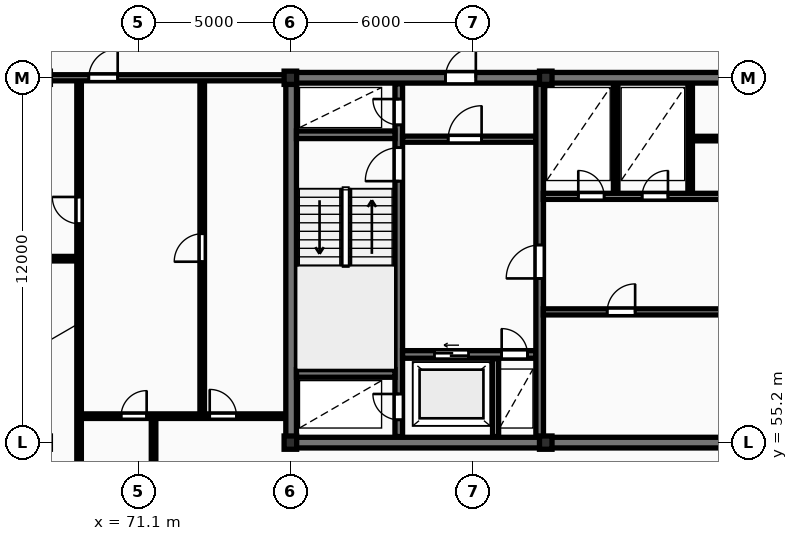
"""IFC4 building model, lengths in metres.
Left out: names, types, materials, properties, quantities, classifications, styles, units other than length and angle.
Written with IfcOpenShell. Run it as: python <this file> out.ifc"""

import sys

from ifc_helpers import new_model, si_unit, direction, frame, frame_2d, origin, origin_2d, place, context, subcontext, project, spatial, rectangle, i_section, extrude, element, fill, save


model = new_model("IFC4")
c1 = context("Model", 3, precision=1e-05, world=origin(), true_north=direction((0.0, 1.0)))
c2 = subcontext(c1, "Body", "Model", "MODEL_VIEW")
j1 = project(units=[si_unit("LENGTHUNIT", "METRE"), si_unit("PLANEANGLEUNIT", "RADIAN")], contexts=[c1])
p1 = place(None, origin())
s1 = spatial("IfcSite", under=j1, at=p1, CompositionType="ELEMENT")
p2 = place(p1, origin())
s2 = spatial("IfcBuilding", under=s1, at=p2, CompositionType="ELEMENT")
p3 = place(p2, frame((0.0, 0.0, 142.9)))
s3 = spatial("IfcBuildingStorey", under=s2, at=p3, CompositionType="ELEMENT", Elevation=142.9)
for number, where, z_axis, x_axis in (
    (1, (76.1, 55.2, 0.0), (0.0, 0.0, 1.0), (1.0, 0.0, 0.0)),
    (2, (76.1, 67.2, 0.0), (0.0, 0.0, 1.0), (1.0, 0.0, 0.0)),
    (3, (84.5, 55.2, 0.0), (0.0, 0.0, 1.0), (1.0, 0.0, 0.0)),
    (4, (84.5, 67.2, 0.0), (0.0, 0.0, 1.0), (1.0, 0.0, 0.0)),
):
    element("IfcColumn", number, at=place(p3, frame(where, z_axis=z_axis, x_axis=x_axis)), inside=s3, PredefinedType="COLUMN", context=c2, shape_type="SweptSolid", body=[
        extrude(i_section(OverallWidth=0.412, OverallDepth=0.437, WebThickness=0.036, FlangeThickness=0.052, FilletRadius=0.015, at=origin_2d()), origin(), (0.0, 0.0, 1.0), 3.6),
    ])
p4 = place(p3, frame((75.95, 55.2, 0.0), z_axis=(0.0, 0.0, 1.0), x_axis=(1.0, 0.0, 0.0)))
e5 = element("IfcWall", 5, at=p4, inside=s3, PredefinedType="SHEAR", context=c2, shape_type="SweptSolid", body=[
    extrude(rectangle(XDim=36.3, YDim=0.35, at=frame_2d((18.15, 0.0))), origin(), (0.0, 0.0, 1.0), 3.6),
])
p5 = place(p4, frame((15.1, 0.0, 0.0)))
e6 = element("IfcOpeningElement", 6, at=p5, cuts=e5, PredefinedType="OPENING", context=c2, shape_type="SweptSolid", body=[
    extrude(rectangle(XDim=1.1, YDim=2.1, at=frame_2d((0.55, 1.05))), frame((0.0, 0.185, 0.0), z_axis=(0.0, -1.0, 0.0), x_axis=(1.0, 0.0, 0.0)), (0.0, 0.0, 1.0), 0.37),
])
p6 = place(p3, frame((76.125, 55.375, 0.0), z_axis=(0.0, 0.0, 1.0), x_axis=(0.0, 1.0, 0.0)))
e7 = element("IfcWall", 7, at=p6, inside=s3, PredefinedType="SHEAR", context=c2, shape_type="SweptSolid", body=[
    extrude(rectangle(XDim=11.65, YDim=0.35, at=frame_2d((5.825, 0.0))), origin(), (0.0, 0.0, 1.0), 3.6),
])
p7 = place(p3, frame((75.95, 67.2, 0.0), z_axis=(0.0, 0.0, 1.0), x_axis=(1.0, 0.0, 0.0)))
e8 = element("IfcWall", 8, at=p7, inside=s3, PredefinedType="SHEAR", context=c2, shape_type="SweptSolid", body=[
    extrude(rectangle(XDim=36.3, YDim=0.35, at=frame_2d((18.15, 0.0))), origin(), (0.0, 0.0, 1.0), 3.6),
])
p8 = place(p7, frame((5.25, 0.0, 0.0)))
e9 = element("IfcOpeningElement", 9, at=p8, cuts=e8, PredefinedType="OPENING", context=c2, shape_type="SweptSolid", body=[
    extrude(rectangle(XDim=1.0, YDim=2.15, at=frame_2d((0.5, 1.075))), frame((0.0, 0.185, 0.0), z_axis=(0.0, -1.0, 0.0), x_axis=(1.0, 0.0, 0.0)), (0.0, 0.0, 1.0), 0.37),
])
p9 = place(p7, frame((21.6, 0.0, 0.0)))
e10 = element("IfcOpeningElement", 10, at=p9, cuts=e8, PredefinedType="OPENING", context=c2, shape_type="SweptSolid", body=[
    extrude(rectangle(XDim=1.5, YDim=2.2, at=frame_2d((0.75, 1.1))), frame((0.0, 0.185, 0.0), z_axis=(0.0, -1.0, 0.0), x_axis=(1.0, 0.0, 0.0)), (0.0, 0.0, 1.0), 0.37),
])
p10 = place(p7, frame((30.45, 0.0, 0.0)))
e11 = element("IfcOpeningElement", 11, at=p10, cuts=e8, PredefinedType="OPENING", context=c2, shape_type="SweptSolid", body=[
    extrude(rectangle(XDim=1.0, YDim=2.15, at=frame_2d((0.5, 1.075))), frame((0.0, 0.185, 0.0), z_axis=(0.0, -1.0, 0.0), x_axis=(1.0, 0.0, 0.0)), (0.0, 0.0, 1.0), 0.37),
])
p11 = place(p3, frame((79.665, 55.4, 0.0), z_axis=(0.0, 0.0, 1.0), x_axis=(0.0, 1.0, 0.0)))
e12 = element("IfcWall", 12, at=p11, inside=s3, PredefinedType="SHEAR", context=c2, shape_type="SweptSolid", body=[
    extrude(rectangle(XDim=11.6, YDim=0.25, at=frame_2d((5.8, 0.0))), origin(), (0.0, 0.0, 1.0), 3.6),
])
p12 = place(p11, frame((0.55, 0.0, 0.0)))
e13 = element("IfcOpeningElement", 13, at=p12, cuts=e12, PredefinedType="OPENING", context=c2, shape_type="SweptSolid", body=[
    extrude(rectangle(XDim=0.85, YDim=2.05, at=frame_2d((0.425, 1.025))), frame((0.0, 0.135, 0.0), z_axis=(0.0, -1.0, 0.0), x_axis=(1.0, 0.0, 0.0)), (0.0, 0.0, 1.0), 0.27),
])
p13 = place(p11, frame((8.4, 0.0, 0.0)))
e14 = element("IfcOpeningElement", 14, at=p13, cuts=e12, PredefinedType="OPENING", context=c2, shape_type="SweptSolid", body=[
    extrude(rectangle(XDim=1.1, YDim=2.1, at=frame_2d((0.55, 1.05))), frame((0.0, 0.135, 0.0), z_axis=(0.0, -1.0, 0.0), x_axis=(1.0, 0.0, 0.0)), (0.0, 0.0, 1.0), 0.27),
])
p14 = place(p11, frame((10.25, 0.0, 0.0)))
e15 = element("IfcOpeningElement", 15, at=p14, cuts=e12, PredefinedType="OPENING", context=c2, shape_type="SweptSolid", body=[
    extrude(rectangle(XDim=0.85, YDim=2.05, at=frame_2d((0.425, 1.025))), frame((0.0, 0.135, 0.0), z_axis=(0.0, -1.0, 0.0), x_axis=(1.0, 0.0, 0.0)), (0.0, 0.0, 1.0), 0.27),
])
for number, where, z_axis, x_axis in (
    (16, (76.3, 57.475, 0.0), (0.0, 0.0, 1.0), (1.0, 0.0, 0.0)),
    (17, (76.3, 65.325, 0.0), (0.0, 0.0, 1.0), (1.0, 0.0, 0.0)),
):
    element("IfcWall", number, at=place(p3, frame(where, z_axis=z_axis, x_axis=x_axis)), inside=s3, PredefinedType="SHEAR", context=c2, shape_type="SweptSolid", body=[
        extrude(rectangle(XDim=3.24, YDim=0.25, at=frame_2d((1.62, 0.0))), origin(), (0.0, 0.0, 1.0), 3.6),
    ])
p15 = place(p3, frame((79.79, 58.1, 0.0), z_axis=(0.0, 0.0, 1.0), x_axis=(1.0, 0.0, 0.0)))
e18 = element("IfcWall", 18, at=p15, inside=s3, PredefinedType="SHEAR", context=c2, shape_type="SweptSolid", body=[
    extrude(rectangle(XDim=4.39, YDim=0.25, at=frame_2d((2.195, 0.0))), origin(), (0.0, 0.0, 1.0), 3.6),
])
p16 = place(p15, frame((1.05, 0.0, 0.0)))
e19 = element("IfcOpeningElement", 19, at=p16, cuts=e18, PredefinedType="OPENING", context=c2, shape_type="SweptSolid", body=[
    extrude(rectangle(XDim=1.12, YDim=2.12, at=frame_2d((0.56, 1.06))), frame((0.0, 0.135, 0.0), z_axis=(0.0, -1.0, 0.0), x_axis=(1.0, 0.0, 0.0)), (0.0, 0.0, 1.0), 0.27),
])
p17 = place(p15, frame((3.26, 0.0, 0.0)))
e20 = element("IfcOpeningElement", 20, at=p17, cuts=e18, PredefinedType="OPENING", context=c2, shape_type="SweptSolid", body=[
    extrude(rectangle(XDim=0.85, YDim=2.05, at=frame_2d((0.425, 1.025))), frame((0.0, 0.135, 0.0), z_axis=(0.0, -1.0, 0.0), x_axis=(1.0, 0.0, 0.0)), (0.0, 0.0, 1.0), 0.27),
])
p18 = place(p3, frame((82.85, 55.4, 0.0), z_axis=(0.0, 0.0, 1.0), x_axis=(0.0, 1.0, 0.0)))
e21 = element("IfcWall", 21, at=p18, inside=s3, PredefinedType="PARTITIONING", context=c2, shape_type="SweptSolid", body=[
    extrude(rectangle(XDim=2.56, YDim=0.2, at=frame_2d((1.28, 0.0))), origin(), (0.0, 0.0, 1.0), 3.31),
])
p19 = place(p3, frame((79.79, 65.18, 0.0), z_axis=(0.0, 0.0, 1.0), x_axis=(1.0, 0.0, 0.0)))
e22 = element("IfcWall", 22, at=p19, inside=s3, PredefinedType="PARTITIONING", context=c2, shape_type="SweptSolid", body=[
    extrude(rectangle(XDim=4.39, YDim=0.2, at=frame_2d((2.195, 0.0))), origin(), (0.0, 0.0, 1.0), 3.31),
])
p20 = place(p19, frame((1.5, 0.0, 0.0)))
e23 = element("IfcOpeningElement", 23, at=p20, cuts=e22, PredefinedType="OPENING", context=c2, shape_type="SweptSolid", body=[
    extrude(rectangle(XDim=1.1, YDim=2.1, at=frame_2d((0.55, 1.05))), frame((0.0, 0.11, 0.0), z_axis=(0.0, -1.0, 0.0), x_axis=(1.0, 0.0, 0.0)), (0.0, 0.0, 1.0), 0.22),
])
p21 = place(p3, frame((84.3, 55.4, 0.0), z_axis=(0.0, 0.0, 1.0), x_axis=(0.0, 1.0, 0.0)))
e24 = element("IfcWall", 24, at=p21, inside=s3, PredefinedType="SHEAR", context=c2, shape_type="SweptSolid", body=[
    extrude(rectangle(XDim=11.6, YDim=0.25, at=frame_2d((5.8, 0.0))), origin(), (0.0, 0.0, 1.0), 3.6),
])
p22 = place(p21, frame((5.2, 0.0, 0.0)))
e25 = element("IfcOpeningElement", 25, at=p22, cuts=e24, PredefinedType="OPENING", context=c2, shape_type="SweptSolid", body=[
    extrude(rectangle(XDim=1.1, YDim=2.1, at=frame_2d((0.55, 1.05))), frame((0.0, 0.135, 0.0), z_axis=(0.0, -1.0, 0.0), x_axis=(1.0, 0.0, 0.0)), (0.0, 0.0, 1.0), 0.27),
])
p23 = place(p3, frame((84.42, 59.5, 0.0), z_axis=(0.0, 0.0, 1.0), x_axis=(1.0, 0.0, 0.0)))
e26 = element("IfcWall", 26, at=p23, inside=s3, PredefinedType="PARTITIONING", context=c2, shape_type="SweptSolid", body=[
    extrude(rectangle(XDim=8.36, YDim=0.2, at=frame_2d((4.18, 0.0))), origin(), (0.0, 0.0, 1.0), 3.31),
])
p24 = place(p23, frame((2.1, 0.0, 0.0)))
e27 = element("IfcOpeningElement", 27, at=p24, cuts=e26, PredefinedType="OPENING", context=c2, shape_type="SweptSolid", body=[
    extrude(rectangle(XDim=0.92, YDim=2.08, at=frame_2d((0.46, 1.04))), frame((0.0, 0.11, 0.0), z_axis=(0.0, -1.0, 0.0), x_axis=(1.0, 0.0, 0.0)), (0.0, 0.0, 1.0), 0.22),
])
p25 = place(p23, frame((6.38, 0.0, 0.0)))
e28 = element("IfcOpeningElement", 28, at=p25, cuts=e26, PredefinedType="OPENING", context=c2, shape_type="SweptSolid", body=[
    extrude(rectangle(XDim=1.1, YDim=2.1, at=frame_2d((0.55, 1.05))), frame((0.0, 0.11, 0.0), z_axis=(0.0, -1.0, 0.0), x_axis=(1.0, 0.0, 0.0)), (0.0, 0.0, 1.0), 0.22),
])
for number, where, z_axis, x_axis in (
    (29, (86.8, 63.4, 0.0), (0.0, 0.0, 1.0), (0.0, 1.0, 0.0)),
    (30, (89.25, 63.4, 0.0), (0.0, 0.0, 1.0), (0.0, 1.0, 0.0)),
):
    element("IfcWall", number, at=place(p3, frame(where, z_axis=z_axis, x_axis=x_axis)), inside=s3, PredefinedType="PARTITIONING", context=c2, shape_type="SweptSolid", body=[
        extrude(rectangle(XDim=3.6, YDim=0.15, at=frame_2d((1.8, 0.0))), origin(), (0.0, 0.0, 1.0), 3.31),
    ])
p26 = place(p3, frame((89.25, 65.2, 0.0), z_axis=(0.0, 0.0, 1.0), x_axis=(1.0, 0.0, 0.0)))
e31 = element("IfcWall", 31, at=p26, inside=s3, PredefinedType="PARTITIONING", context=c2, shape_type="SweptSolid", body=[
    extrude(rectangle(XDim=7.05, YDim=0.15, at=frame_2d((3.525, 0.0))), origin(), (0.0, 0.0, 1.0), 3.31),
])
p27 = place(p26, frame((1.6, 0.0, 0.0)))
e32 = element("IfcOpeningElement", 32, at=p27, cuts=e31, PredefinedType="OPENING", context=c2, shape_type="SweptSolid", body=[
    extrude(rectangle(XDim=0.88, YDim=2.06, at=frame_2d((0.44, 1.03))), frame((0.0, 0.085, 0.0), z_axis=(0.0, -1.0, 0.0), x_axis=(1.0, 0.0, 0.0)), (0.0, 0.0, 1.0), 0.17),
])
p28 = place(p3, frame((84.42, 63.3, 0.0), z_axis=(0.0, 0.0, 1.0), x_axis=(1.0, 0.0, 0.0)))
e33 = element("IfcWall", 33, at=p28, inside=s3, PredefinedType="PARTITIONING", context=c2, shape_type="SweptSolid", body=[
    extrude(rectangle(XDim=19.83, YDim=0.2, at=frame_2d((9.915, 0.0))), origin(), (0.0, 0.0, 1.0), 3.31),
])
p29 = place(p28, frame((1.15, 0.0, 0.0)))
e34 = element("IfcOpeningElement", 34, at=p29, cuts=e33, PredefinedType="OPENING", context=c2, shape_type="SweptSolid", body=[
    extrude(rectangle(XDim=0.85, YDim=2.05, at=frame_2d((0.425, 1.025))), frame((0.0, 0.11, 0.0), z_axis=(0.0, -1.0, 0.0), x_axis=(1.0, 0.0, 0.0)), (0.0, 0.0, 1.0), 0.22),
])
p30 = place(p28, frame((3.25, 0.0, 0.0)))
e35 = element("IfcOpeningElement", 35, at=p30, cuts=e33, PredefinedType="OPENING", context=c2, shape_type="SweptSolid", body=[
    extrude(rectangle(XDim=0.85, YDim=2.05, at=frame_2d((0.425, 1.025))), frame((0.0, 0.11, 0.0), z_axis=(0.0, -1.0, 0.0), x_axis=(1.0, 0.0, 0.0)), (0.0, 0.0, 1.0), 0.22),
])
p31 = place(p28, frame((13.08, 0.0, 0.0)))
e36 = element("IfcOpeningElement", 36, at=p31, cuts=e33, PredefinedType="OPENING", context=c2, shape_type="SweptSolid", body=[
    extrude(rectangle(XDim=1.5, YDim=2.2, at=frame_2d((0.75, 1.1))), frame((0.0, 0.11, 0.0), z_axis=(0.0, -1.0, 0.0), x_axis=(1.0, 0.0, 0.0)), (0.0, 0.0, 1.0), 0.22),
])
p32 = place(p28, frame((6.68, 0.0, 0.0)))
e37 = element("IfcOpeningElement", 37, at=p32, cuts=e33, PredefinedType="OPENING", context=c2, shape_type="SweptSolid", body=[
    extrude(rectangle(XDim=0.92, YDim=2.08, at=frame_2d((0.46, 1.04))), frame((0.0, 0.11, 0.0), z_axis=(0.0, -1.0, 0.0), x_axis=(1.0, 0.0, 0.0)), (0.0, 0.0, 1.0), 0.22),
])
p33 = place(p28, frame((16.33, 0.0, 0.0)))
e38 = element("IfcOpeningElement", 38, at=p33, cuts=e33, PredefinedType="OPENING", context=c2, shape_type="SweptSolid", body=[
    extrude(rectangle(XDim=0.88, YDim=2.06, at=frame_2d((0.44, 1.03))), frame((0.0, 0.11, 0.0), z_axis=(0.0, -1.0, 0.0), x_axis=(1.0, 0.0, 0.0)), (0.0, 0.0, 1.0), 0.22),
])
p34 = place(p3, frame((57.6, 61.25, 0.0), z_axis=(0.0, 0.0, 1.0), x_axis=(1.0, 0.0, 0.0)))
e39 = element("IfcWall", 39, at=p34, inside=s3, PredefinedType="PARTITIONING", context=c2, shape_type="SweptSolid", body=[
    extrude(rectangle(XDim=11.55, YDim=0.15, at=frame_2d((5.775, 0.0))), origin(), (0.0, 0.0, 1.0), 3.31),
])
p35 = place(p34, frame((5.355, 0.0, 0.0)))
e40 = element("IfcOpeningElement", 40, at=p35, cuts=e39, PredefinedType="OPENING", context=c2, shape_type="SweptSolid", body=[
    extrude(rectangle(XDim=0.84, YDim=2.04, at=frame_2d((0.42, 1.02))), frame((0.0, 0.085, 0.0), z_axis=(0.0, -1.0, 0.0), x_axis=(1.0, 0.0, 0.0)), (0.0, 0.0, 1.0), 0.17),
])
p36 = place(p3, frame((69.15, 51.1, 0.0), z_axis=(0.0, 0.0, 1.0), x_axis=(0.0, 1.0, 0.0)))
e41 = element("IfcWall", 41, at=p36, inside=s3, PredefinedType="PARTITIONING", context=c2, shape_type="SweptSolid", body=[
    extrude(rectangle(XDim=16.05, YDim=0.15, at=frame_2d((8.025, 0.0))), origin(), (0.0, 0.0, 1.0), 3.31),
])
p37 = place(p36, frame((11.3, 0.0, 0.0)))
e42 = element("IfcOpeningElement", 42, at=p37, cuts=e41, PredefinedType="OPENING", context=c2, shape_type="SweptSolid", body=[
    extrude(rectangle(XDim=0.88, YDim=2.06, at=frame_2d((0.44, 1.03))), frame((0.0, 0.085, 0.0), z_axis=(0.0, -1.0, 0.0), x_axis=(1.0, 0.0, 0.0)), (0.0, 0.0, 1.0), 0.17),
])
p38 = place(p3, frame((73.2, 56.07, 0.0), z_axis=(0.0, 0.0, 1.0), x_axis=(0.0, 1.0, 0.0)))
e43 = element("IfcWall", 43, at=p38, inside=s3, PredefinedType="PARTITIONING", context=c2, shape_type="SweptSolid", body=[
    extrude(rectangle(XDim=11.08, YDim=0.15, at=frame_2d((5.54, 0.0))), origin(), (0.0, 0.0, 1.0), 3.31),
])
p39 = place(p38, frame((5.08, 0.0, 0.0)))
e44 = element("IfcOpeningElement", 44, at=p39, cuts=e43, PredefinedType="OPENING", context=c2, shape_type="SweptSolid", body=[
    extrude(rectangle(XDim=0.92, YDim=2.08, at=frame_2d((0.46, 1.04))), frame((0.0, 0.085, 0.0), z_axis=(0.0, -1.0, 0.0), x_axis=(1.0, 0.0, 0.0)), (0.0, 0.0, 1.0), 0.17),
])
p40 = place(p3, frame((71.6, 51.1, 0.0), z_axis=(0.0, 0.0, 1.0), x_axis=(0.0, 1.0, 0.0)))
e45 = element("IfcWall", 45, at=p40, inside=s3, PredefinedType="PARTITIONING", context=c2, shape_type="SweptSolid", body=[
    extrude(rectangle(XDim=4.97, YDim=0.15, at=frame_2d((2.485, 0.0))), origin(), (0.0, 0.0, 1.0), 3.31),
])
p41 = place(p3, frame((69.17, 56.07, 0.0), z_axis=(0.0, 0.0, 1.0), x_axis=(1.0, 0.0, 0.0)))
e46 = element("IfcWall", 46, at=p41, inside=s3, PredefinedType="PARTITIONING", context=c2, shape_type="SweptSolid", body=[
    extrude(rectangle(XDim=6.76, YDim=0.15, at=frame_2d((3.38, 0.0))), origin(), (0.0, 0.0, 1.0), 3.31),
])
p42 = place(p41, frame((1.362, 0.0, 0.0)))
e47 = element("IfcOpeningElement", 47, at=p42, cuts=e46, PredefinedType="OPENING", context=c2, shape_type="SweptSolid", body=[
    extrude(rectangle(XDim=0.84, YDim=2.04, at=frame_2d((0.42, 1.02))), frame((0.0, 0.085, 0.0), z_axis=(0.0, -1.0, 0.0), x_axis=(1.0, 0.0, 0.0)), (0.0, 0.0, 1.0), 0.17),
])
p43 = place(p41, frame((4.277, 0.0, 0.0)))
e48 = element("IfcOpeningElement", 48, at=p43, cuts=e46, PredefinedType="OPENING", context=c2, shape_type="SweptSolid", body=[
    extrude(rectangle(XDim=0.88, YDim=2.06, at=frame_2d((0.44, 1.03))), frame((0.0, 0.085, 0.0), z_axis=(0.0, -1.0, 0.0), x_axis=(1.0, 0.0, 0.0)), (0.0, 0.0, 1.0), 0.17),
])
p44 = place(p3, frame((57.6, 67.2, 0.0), z_axis=(0.0, 0.0, 1.0), x_axis=(1.0, 0.0, 0.0)))
e49 = element("IfcWall", 49, at=p44, inside=s3, PredefinedType="PARTITIONING", context=c2, shape_type="SweptSolid", body=[
    extrude(rectangle(XDim=18.35, YDim=0.2, at=frame_2d((9.175, 0.0))), origin(), (0.0, 0.0, 1.0), 2.773),
])
p45 = place(p44, frame((11.87, 0.0, 0.0)))
e50 = element("IfcOpeningElement", 50, at=p45, cuts=e49, PredefinedType="OPENING", context=c2, shape_type="SweptSolid", body=[
    extrude(rectangle(XDim=0.95, YDim=2.15, at=frame_2d((0.475, 1.075))), frame((0.0, 0.11, 0.0), z_axis=(0.0, -1.0, 0.0), x_axis=(1.0, 0.0, 0.0)), (0.0, 0.0, 1.0), 0.22),
])
p46 = place(p8, origin())
e51 = element("IfcDoor", 51, at=p46, inside=s3, OperationType="SINGLE_SWING_RIGHT", PredefinedType="DOOR", context=c2, shape_type="SweptSolid", body=[
    extrude(rectangle(XDim=1.0, YDim=2.15, at=frame_2d((0.5, 1.075))), frame((0.0, 0.025, 0.0), z_axis=(0.0, -1.0, 0.0), x_axis=(1.0, 0.0, 0.0)), (0.0, 0.0, 1.0), 0.05),
])
fill(e9, e51)
p47 = place(p12, origin())
e52 = element("IfcDoor", 52, at=p47, inside=s3, OperationType="SINGLE_SWING_RIGHT", PredefinedType="DOOR", context=c2, shape_type="SweptSolid", body=[
    extrude(rectangle(XDim=0.85, YDim=2.05, at=frame_2d((0.425, 1.025))), frame((0.0, 0.025, 0.0), z_axis=(0.0, -1.0, 0.0), x_axis=(1.0, 0.0, 0.0)), (0.0, 0.0, 1.0), 0.05),
])
fill(e13, e52)
p48 = place(p13, origin())
e53 = element("IfcDoor", 53, at=p48, inside=s3, OperationType="SINGLE_SWING_LEFT", PredefinedType="DOOR", context=c2, shape_type="SweptSolid", body=[
    extrude(rectangle(XDim=1.1, YDim=2.1, at=frame_2d((0.55, 1.05))), frame((0.0, 0.025, 0.0), z_axis=(0.0, -1.0, 0.0), x_axis=(1.0, 0.0, 0.0)), (0.0, 0.0, 1.0), 0.05),
])
fill(e14, e53)
p49 = place(p14, origin())
e54 = element("IfcDoor", 54, at=p49, inside=s3, OperationType="SINGLE_SWING_RIGHT", PredefinedType="DOOR", context=c2, shape_type="SweptSolid", body=[
    extrude(rectangle(XDim=0.85, YDim=2.05, at=frame_2d((0.425, 1.025))), frame((0.0, 0.025, 0.0), z_axis=(0.0, -1.0, 0.0), x_axis=(1.0, 0.0, 0.0)), (0.0, 0.0, 1.0), 0.05),
])
fill(e15, e54)
p50 = place(p16, origin())
e55 = element("IfcDoor", 55, at=p50, inside=s3, OperationType="SLIDING_TO_LEFT", PredefinedType="DOOR", context=c2, shape_type="SweptSolid", body=[
    extrude(rectangle(XDim=1.12, YDim=2.12, at=frame_2d((0.56, 1.06))), frame((0.0, 0.025, 0.0), z_axis=(0.0, -1.0, 0.0), x_axis=(1.0, 0.0, 0.0)), (0.0, 0.0, 1.0), 0.05),
])
fill(e19, e55)
p51 = place(p17, origin())
e56 = element("IfcDoor", 56, at=p51, inside=s3, OperationType="SINGLE_SWING_LEFT", PredefinedType="DOOR", context=c2, shape_type="SweptSolid", body=[
    extrude(rectangle(XDim=0.85, YDim=2.05, at=frame_2d((0.425, 1.025))), frame((0.0, 0.025, 0.0), z_axis=(0.0, -1.0, 0.0), x_axis=(1.0, 0.0, 0.0)), (0.0, 0.0, 1.0), 0.05),
])
fill(e20, e56)
p52 = place(p20, origin())
e57 = element("IfcDoor", 57, at=p52, inside=s3, OperationType="SINGLE_SWING_RIGHT", PredefinedType="DOOR", context=c2, shape_type="SweptSolid", body=[
    extrude(rectangle(XDim=1.1, YDim=2.1, at=frame_2d((0.55, 1.05))), frame((0.0, 0.025, 0.0), z_axis=(0.0, -1.0, 0.0), x_axis=(1.0, 0.0, 0.0)), (0.0, 0.0, 1.0), 0.05),
])
fill(e23, e57)
p53 = place(p22, origin())
e58 = element("IfcDoor", 58, at=p53, inside=s3, OperationType="SINGLE_SWING_LEFT", PredefinedType="DOOR", context=c2, shape_type="SweptSolid", body=[
    extrude(rectangle(XDim=1.1, YDim=2.1, at=frame_2d((0.55, 1.05))), frame((0.0, 0.025, 0.0), z_axis=(0.0, -1.0, 0.0), x_axis=(1.0, 0.0, 0.0)), (0.0, 0.0, 1.0), 0.05),
])
fill(e25, e58)
p54 = place(p24, origin())
e59 = element("IfcDoor", 59, at=p54, inside=s3, OperationType="SINGLE_SWING_RIGHT", PredefinedType="DOOR", context=c2, shape_type="SweptSolid", body=[
    extrude(rectangle(XDim=0.92, YDim=2.08, at=frame_2d((0.46, 1.04))), frame((0.0, 0.025, 0.0), z_axis=(0.0, -1.0, 0.0), x_axis=(1.0, 0.0, 0.0)), (0.0, 0.0, 1.0), 0.05),
])
fill(e27, e59)
p55 = place(p29, origin())
e60 = element("IfcDoor", 60, at=p55, inside=s3, OperationType="SINGLE_SWING_LEFT", PredefinedType="DOOR", context=c2, shape_type="SweptSolid", body=[
    extrude(rectangle(XDim=0.85, YDim=2.05, at=frame_2d((0.425, 1.025))), frame((0.0, 0.025, 0.0), z_axis=(0.0, -1.0, 0.0), x_axis=(1.0, 0.0, 0.0)), (0.0, 0.0, 1.0), 0.05),
])
fill(e34, e60)
p56 = place(p30, origin())
e61 = element("IfcDoor", 61, at=p56, inside=s3, OperationType="SINGLE_SWING_RIGHT", PredefinedType="DOOR", context=c2, shape_type="SweptSolid", body=[
    extrude(rectangle(XDim=0.85, YDim=2.05, at=frame_2d((0.425, 1.025))), frame((0.0, 0.025, 0.0), z_axis=(0.0, -1.0, 0.0), x_axis=(1.0, 0.0, 0.0)), (0.0, 0.0, 1.0), 0.05),
])
fill(e35, e61)
p57 = place(p37, origin())
e62 = element("IfcDoor", 62, at=p57, inside=s3, OperationType="SINGLE_SWING_RIGHT", PredefinedType="DOOR", context=c2, shape_type="SweptSolid", body=[
    extrude(rectangle(XDim=0.88, YDim=2.06, at=frame_2d((0.44, 1.03))), frame((0.0, 0.025, 0.0), z_axis=(0.0, -1.0, 0.0), x_axis=(1.0, 0.0, 0.0)), (0.0, 0.0, 1.0), 0.05),
])
fill(e42, e62)
p58 = place(p39, origin())
e63 = element("IfcDoor", 63, at=p58, inside=s3, OperationType="SINGLE_SWING_LEFT", PredefinedType="DOOR", context=c2, shape_type="SweptSolid", body=[
    extrude(rectangle(XDim=0.92, YDim=2.08, at=frame_2d((0.46, 1.04))), frame((0.0, 0.025, 0.0), z_axis=(0.0, -1.0, 0.0), x_axis=(1.0, 0.0, 0.0)), (0.0, 0.0, 1.0), 0.05),
])
fill(e44, e63)
p59 = place(p42, origin())
e64 = element("IfcDoor", 64, at=p59, inside=s3, OperationType="SINGLE_SWING_RIGHT", PredefinedType="DOOR", context=c2, shape_type="SweptSolid", body=[
    extrude(rectangle(XDim=0.84, YDim=2.04, at=frame_2d((0.42, 1.02))), frame((0.0, 0.025, 0.0), z_axis=(0.0, -1.0, 0.0), x_axis=(1.0, 0.0, 0.0)), (0.0, 0.0, 1.0), 0.05),
])
fill(e47, e64)
p60 = place(p43, origin())
e65 = element("IfcDoor", 65, at=p60, inside=s3, OperationType="SINGLE_SWING_LEFT", PredefinedType="DOOR", context=c2, shape_type="SweptSolid", body=[
    extrude(rectangle(XDim=0.88, YDim=2.06, at=frame_2d((0.44, 1.03))), frame((0.0, 0.025, 0.0), z_axis=(0.0, -1.0, 0.0), x_axis=(1.0, 0.0, 0.0)), (0.0, 0.0, 1.0), 0.05),
])
fill(e48, e65)
p61 = place(p45, origin())
e66 = element("IfcDoor", 66, at=p61, inside=s3, OperationType="SINGLE_SWING_RIGHT", PredefinedType="DOOR", context=c2, shape_type="SweptSolid", body=[
    extrude(rectangle(XDim=0.95, YDim=2.15, at=frame_2d((0.475, 1.075))), frame((0.0, 0.025, 0.0), z_axis=(0.0, -1.0, 0.0), x_axis=(1.0, 0.0, 0.0)), (0.0, 0.0, 1.0), 0.05),
])
fill(e50, e66)
save(model, sys.argv[1])
